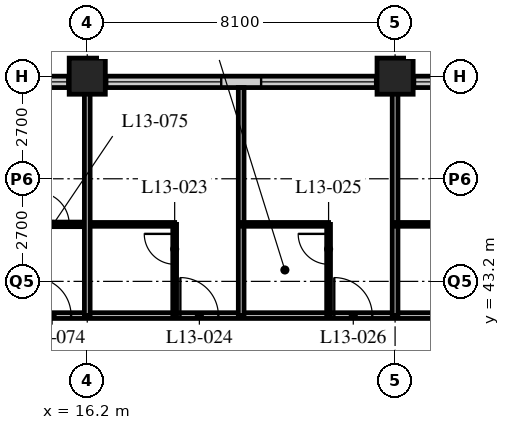
"""IFC4 building model, lengths in metres.
Left out: names, types, materials, properties, quantities, classifications, styles, units other than length and angle.
Written with IfcOpenShell. Run it as: python <this file> out.ifc"""

import sys

from ifc_helpers import new_model, si_unit, direction, frame, frame_2d, origin, origin_2d, place, context, subcontext, project, spatial, rectangle, hollow_rectangle, extrude, element, fill, save


model = new_model("IFC4")
c1 = context("Model", 3, precision=1e-05, world=origin(), true_north=direction((0.0, 1.0)))
c2 = subcontext(c1, "Body", "Model", "MODEL_VIEW")
j1 = project(units=[si_unit("LENGTHUNIT", "METRE"), si_unit("PLANEANGLEUNIT", "RADIAN")], contexts=[c1])
p1 = place(None, origin())
s1 = spatial("IfcSite", under=j1, at=p1, CompositionType="ELEMENT")
p2 = place(p1, origin())
s2 = spatial("IfcBuilding", under=s1, at=p2, CompositionType="ELEMENT")
p3 = place(p2, frame((0.0, 0.0, 56.8)))
s3 = spatial("IfcBuildingStorey", under=s2, at=p3, CompositionType="ELEMENT", Elevation=56.8)
for number, where, z_axis, x_axis in (
    (1, (16.2, 48.6, 0.0), (0.0, 0.0, 1.0), (1.0, 0.0, 0.0)),
    (2, (24.3, 48.6, 0.0), (0.0, 0.0, 1.0), (1.0, 0.0, 0.0)),
):
    element("IfcColumn", number, at=place(p3, frame(where, z_axis=z_axis, x_axis=x_axis)), inside=s3, PredefinedType="COLUMN", context=c2, shape_type="SweptSolid", body=[
        extrude(hollow_rectangle(XDim=0.95, YDim=0.95, WallThickness=0.095, at=origin_2d()), origin(), (0.0, 0.0, 1.0), 3.4),
    ])
p4 = place(p3, frame((48.3, 48.45, 0.0), z_axis=(0.0, 0.0, 1.0), x_axis=(-1.0, 0.0, 0.0)))
e3 = element("IfcWall", 3, at=p4, inside=s3, PredefinedType="SOLIDWALL", context=c2, shape_type="SweptSolid", body=[
    extrude(rectangle(XDim=40.2, YDim=0.3, at=frame_2d((20.1, 0.0))), origin(), (0.0, 0.0, 1.0), 3.19),
])
p5 = place(p4, frame((0.225, 0.0, 0.9)))
e4 = element("IfcOpeningElement", 4, at=p5, cuts=e3, PredefinedType="OPENING", context=c2, shape_type="SweptSolid", body=[
    extrude(rectangle(XDim=3.0, YDim=2.0, at=frame_2d((1.5, 1.0))), frame((0.0, 0.16, 0.0), z_axis=(0.0, -1.0, 0.0), x_axis=(1.0, 0.0, 0.0)), (0.0, 0.0, 1.0), 0.32),
])
p6 = place(p4, frame((4.275, 0.0, 0.9)))
e5 = element("IfcOpeningElement", 5, at=p6, cuts=e3, PredefinedType="OPENING", context=c2, shape_type="SweptSolid", body=[
    extrude(rectangle(XDim=3.0, YDim=2.0, at=frame_2d((1.5, 1.0))), frame((0.0, 0.16, 0.0), z_axis=(0.0, -1.0, 0.0), x_axis=(1.0, 0.0, 0.0)), (0.0, 0.0, 1.0), 0.32),
])
p7 = place(p4, frame((8.325, 0.0, 0.9)))
e6 = element("IfcOpeningElement", 6, at=p7, cuts=e3, PredefinedType="OPENING", context=c2, shape_type="SweptSolid", body=[
    extrude(rectangle(XDim=3.0, YDim=2.0, at=frame_2d((1.5, 1.0))), frame((0.0, 0.16, 0.0), z_axis=(0.0, -1.0, 0.0), x_axis=(1.0, 0.0, 0.0)), (0.0, 0.0, 1.0), 0.32),
])
p8 = place(p4, frame((12.375, 0.0, 0.9)))
e7 = element("IfcOpeningElement", 7, at=p8, cuts=e3, PredefinedType="OPENING", context=c2, shape_type="SweptSolid", body=[
    extrude(rectangle(XDim=3.0, YDim=2.0, at=frame_2d((1.5, 1.0))), frame((0.0, 0.16, 0.0), z_axis=(0.0, -1.0, 0.0), x_axis=(1.0, 0.0, 0.0)), (0.0, 0.0, 1.0), 0.32),
])
p9 = place(p4, frame((16.425, 0.0, 0.9)))
e8 = element("IfcOpeningElement", 8, at=p9, cuts=e3, PredefinedType="OPENING", context=c2, shape_type="SweptSolid", body=[
    extrude(rectangle(XDim=3.0, YDim=2.0, at=frame_2d((1.5, 1.0))), frame((0.0, 0.16, 0.0), z_axis=(0.0, -1.0, 0.0), x_axis=(1.0, 0.0, 0.0)), (0.0, 0.0, 1.0), 0.32),
])
p10 = place(p4, frame((20.475, 0.0, 0.9)))
e9 = element("IfcOpeningElement", 9, at=p10, cuts=e3, PredefinedType="OPENING", context=c2, shape_type="SweptSolid", body=[
    extrude(rectangle(XDim=3.0, YDim=2.0, at=frame_2d((1.5, 1.0))), frame((0.0, 0.16, 0.0), z_axis=(0.0, -1.0, 0.0), x_axis=(1.0, 0.0, 0.0)), (0.0, 0.0, 1.0), 0.32),
])
p11 = place(p4, frame((24.525, 0.0, 0.9)))
e10 = element("IfcOpeningElement", 10, at=p11, cuts=e3, PredefinedType="OPENING", context=c2, shape_type="SweptSolid", body=[
    extrude(rectangle(XDim=3.0, YDim=2.0, at=frame_2d((1.5, 1.0))), frame((0.0, 0.16, 0.0), z_axis=(0.0, -1.0, 0.0), x_axis=(1.0, 0.0, 0.0)), (0.0, 0.0, 1.0), 0.32),
])
p12 = place(p4, frame((28.575, 0.0, 0.9)))
e11 = element("IfcOpeningElement", 11, at=p12, cuts=e3, PredefinedType="OPENING", context=c2, shape_type="SweptSolid", body=[
    extrude(rectangle(XDim=3.0, YDim=2.0, at=frame_2d((1.5, 1.0))), frame((0.0, 0.16, 0.0), z_axis=(0.0, -1.0, 0.0), x_axis=(1.0, 0.0, 0.0)), (0.0, 0.0, 1.0), 0.32),
])
p13 = place(p4, frame((32.625, 0.0, 0.9)))
e12 = element("IfcOpeningElement", 12, at=p13, cuts=e3, PredefinedType="OPENING", context=c2, shape_type="SweptSolid", body=[
    extrude(rectangle(XDim=3.0, YDim=2.0, at=frame_2d((1.5, 1.0))), frame((0.0, 0.16, 0.0), z_axis=(0.0, -1.0, 0.0), x_axis=(1.0, 0.0, 0.0)), (0.0, 0.0, 1.0), 0.32),
])
p14 = place(p4, frame((36.675, 0.0, 0.9)))
e13 = element("IfcOpeningElement", 13, at=p14, cuts=e3, PredefinedType="OPENING", context=c2, shape_type="SweptSolid", body=[
    extrude(rectangle(XDim=3.0, YDim=2.0, at=frame_2d((1.5, 1.0))), frame((0.0, 0.16, 0.0), z_axis=(0.0, -1.0, 0.0), x_axis=(1.0, 0.0, 0.0)), (0.0, 0.0, 1.0), 0.32),
])
p15 = place(p3, frame((12.15, 42.3, 0.0), z_axis=(0.0, 0.0, 1.0), x_axis=(1.0, 0.0, 0.0)))
e14 = element("IfcWall", 14, at=p15, inside=s3, PredefinedType="PARTITIONING", context=c2, shape_type="SweptSolid", body=[
    extrude(rectangle(XDim=32.4, YDim=0.15, at=frame_2d((16.2, 0.0))), origin(), (0.0, 0.0, 1.0), 3.19),
])
p16 = place(p15, frame((6.5, 0.0, 0.0)))
e15 = element("IfcOpeningElement", 15, at=p16, cuts=e14, PredefinedType="OPENING", context=c2, shape_type="SweptSolid", body=[
    extrude(rectangle(XDim=1.0, YDim=2.1, at=frame_2d((0.5, 1.05))), frame((0.0, 0.085, 0.0), z_axis=(0.0, -1.0, 0.0), x_axis=(1.0, 0.0, 0.0)), (0.0, 0.0, 1.0), 0.17),
])
p17 = place(p15, frame((10.55, 0.0, 0.0)))
e16 = element("IfcOpeningElement", 16, at=p17, cuts=e14, PredefinedType="OPENING", context=c2, shape_type="SweptSolid", body=[
    extrude(rectangle(XDim=1.0, YDim=2.1, at=frame_2d((0.5, 1.05))), frame((0.0, 0.085, 0.0), z_axis=(0.0, -1.0, 0.0), x_axis=(1.0, 0.0, 0.0)), (0.0, 0.0, 1.0), 0.17),
])
p18 = place(p15, frame((14.6, 0.0, 0.0)))
e17 = element("IfcOpeningElement", 17, at=p18, cuts=e14, PredefinedType="OPENING", context=c2, shape_type="SweptSolid", body=[
    extrude(rectangle(XDim=1.0, YDim=2.1, at=frame_2d((0.5, 1.05))), frame((0.0, 0.085, 0.0), z_axis=(0.0, -1.0, 0.0), x_axis=(1.0, 0.0, 0.0)), (0.0, 0.0, 1.0), 0.17),
])
p19 = place(p15, frame((18.65, 0.0, 0.0)))
e18 = element("IfcOpeningElement", 18, at=p19, cuts=e14, PredefinedType="OPENING", context=c2, shape_type="SweptSolid", body=[
    extrude(rectangle(XDim=1.0, YDim=2.1, at=frame_2d((0.5, 1.05))), frame((0.0, 0.085, 0.0), z_axis=(0.0, -1.0, 0.0), x_axis=(1.0, 0.0, 0.0)), (0.0, 0.0, 1.0), 0.17),
])
p20 = place(p15, frame((22.7, 0.0, 0.0)))
e19 = element("IfcOpeningElement", 19, at=p20, cuts=e14, PredefinedType="OPENING", context=c2, shape_type="SweptSolid", body=[
    extrude(rectangle(XDim=1.0, YDim=2.1, at=frame_2d((0.5, 1.05))), frame((0.0, 0.085, 0.0), z_axis=(0.0, -1.0, 0.0), x_axis=(1.0, 0.0, 0.0)), (0.0, 0.0, 1.0), 0.17),
])
p21 = place(p15, frame((26.75, 0.0, 0.0)))
e20 = element("IfcOpeningElement", 20, at=p21, cuts=e14, PredefinedType="OPENING", context=c2, shape_type="SweptSolid", body=[
    extrude(rectangle(XDim=1.0, YDim=2.1, at=frame_2d((0.5, 1.05))), frame((0.0, 0.085, 0.0), z_axis=(0.0, -1.0, 0.0), x_axis=(1.0, 0.0, 0.0)), (0.0, 0.0, 1.0), 0.17),
])
p22 = place(p15, frame((28.775, 0.0, 0.0)))
e21 = element("IfcOpeningElement", 21, at=p22, cuts=e14, PredefinedType="OPENING", context=c2, shape_type="SweptSolid", body=[
    extrude(rectangle(XDim=1.0, YDim=2.1, at=frame_2d((0.5, 1.05))), frame((0.0, 0.085, 0.0), z_axis=(0.0, -1.0, 0.0), x_axis=(1.0, 0.0, 0.0)), (0.0, 0.0, 1.0), 0.17),
])
p23 = place(p15, frame((2.625, 0.0, 0.0)))
e22 = element("IfcOpeningElement", 22, at=p23, cuts=e14, PredefinedType="OPENING", context=c2, shape_type="SweptSolid", body=[
    extrude(rectangle(XDim=1.0, YDim=2.1, at=frame_2d((0.5, 1.05))), frame((0.0, 0.085, 0.0), z_axis=(0.0, -1.0, 0.0), x_axis=(1.0, 0.0, 0.0)), (0.0, 0.0, 1.0), 0.17),
])
p24 = place(p3, frame((16.2, 44.7, 0.0), z_axis=(0.0, 0.0, 1.0), x_axis=(1.0, 0.0, 0.0)))
e23 = element("IfcWall", 23, at=p24, inside=s3, PredefinedType="PARTITIONING", context=c2, shape_type="SweptSolid", body=[
    extrude(rectangle(XDim=2.3, YDim=0.1, at=frame_2d((1.15, 0.0))), origin(), (0.0, 0.0, 1.0), 3.19),
])
p25 = place(p3, frame((18.5, 42.3, 0.0), z_axis=(0.0, 0.0, 1.0), x_axis=(0.0, 1.0, 0.0)))
e24 = element("IfcWall", 24, at=p25, inside=s3, PredefinedType="PARTITIONING", context=c2, shape_type="SweptSolid", body=[
    extrude(rectangle(XDim=2.4, YDim=0.1, at=frame_2d((1.2, 0.0))), origin(), (0.0, 0.0, 1.0), 3.19),
])
p26 = place(p25, frame((1.35, 0.0, 0.0)))
e25 = element("IfcOpeningElement", 25, at=p26, cuts=e24, PredefinedType="OPENING", context=c2, shape_type="SweptSolid", body=[
    extrude(rectangle(XDim=0.8, YDim=2.1, at=frame_2d((0.4, 1.05))), frame((0.0, 0.06, 0.0), z_axis=(0.0, -1.0, 0.0), x_axis=(1.0, 0.0, 0.0)), (0.0, 0.0, 1.0), 0.12),
])
p27 = place(p3, frame((20.25, 42.3, 0.0), z_axis=(0.0, 0.0, 1.0), x_axis=(0.0, 1.0, 0.0)))
e26 = element("IfcWall", 26, at=p27, inside=s3, PredefinedType="PARTITIONING", context=c2, shape_type="SweptSolid", body=[
    extrude(rectangle(XDim=6.0, YDim=0.15, at=frame_2d((3.0, 0.0))), origin(), (0.0, 0.0, 1.0), 3.19),
])
p28 = place(p3, frame((20.25, 44.7, 0.0), z_axis=(0.0, 0.0, 1.0), x_axis=(1.0, 0.0, 0.0)))
e27 = element("IfcWall", 27, at=p28, inside=s3, PredefinedType="PARTITIONING", context=c2, shape_type="SweptSolid", body=[
    extrude(rectangle(XDim=2.3, YDim=0.1, at=frame_2d((1.15, 0.0))), origin(), (0.0, 0.0, 1.0), 3.19),
])
p29 = place(p3, frame((22.55, 42.3, 0.0), z_axis=(0.0, 0.0, 1.0), x_axis=(0.0, 1.0, 0.0)))
e28 = element("IfcWall", 28, at=p29, inside=s3, PredefinedType="PARTITIONING", context=c2, shape_type="SweptSolid", body=[
    extrude(rectangle(XDim=2.4, YDim=0.1, at=frame_2d((1.2, 0.0))), origin(), (0.0, 0.0, 1.0), 3.19),
])
p30 = place(p29, frame((1.35, 0.0, 0.0)))
e29 = element("IfcOpeningElement", 29, at=p30, cuts=e28, PredefinedType="OPENING", context=c2, shape_type="SweptSolid", body=[
    extrude(rectangle(XDim=0.8, YDim=2.1, at=frame_2d((0.4, 1.05))), frame((0.0, 0.06, 0.0), z_axis=(0.0, -1.0, 0.0), x_axis=(1.0, 0.0, 0.0)), (0.0, 0.0, 1.0), 0.12),
])
p31 = place(p3, frame((24.3, 42.3, 0.0), z_axis=(0.0, 0.0, 1.0), x_axis=(0.0, 1.0, 0.0)))
e30 = element("IfcWall", 30, at=p31, inside=s3, PredefinedType="PARTITIONING", context=c2, shape_type="SweptSolid", body=[
    extrude(rectangle(XDim=6.0, YDim=0.15, at=frame_2d((3.0, 0.0))), origin(), (0.0, 0.0, 1.0), 2.578),
])
p32 = place(p3, frame((24.3, 44.7, 0.0), z_axis=(0.0, 0.0, 1.0), x_axis=(1.0, 0.0, 0.0)))
e31 = element("IfcWall", 31, at=p32, inside=s3, PredefinedType="PARTITIONING", context=c2, shape_type="SweptSolid", body=[
    extrude(rectangle(XDim=2.3, YDim=0.1, at=frame_2d((1.15, 0.0))), origin(), (0.0, 0.0, 1.0), 3.19),
])
p33 = place(p3, frame((12.15, 44.7, 0.0), z_axis=(0.0, 0.0, 1.0), x_axis=(1.0, 0.0, 0.0)))
e32 = element("IfcWall", 32, at=p33, inside=s3, PredefinedType="PARTITIONING", context=c2, shape_type="SweptSolid", body=[
    extrude(rectangle(XDim=4.05, YDim=0.12, at=frame_2d((2.025, 0.0))), origin(), (0.0, 0.0, 1.0), 3.19),
])
p34 = place(p33, frame((2.725, 0.0, 0.0)))
e33 = element("IfcOpeningElement", 33, at=p34, cuts=e32, PredefinedType="OPENING", context=c2, shape_type="SweptSolid", body=[
    extrude(rectangle(XDim=0.85, YDim=2.1, at=frame_2d((0.425, 1.05))), frame((0.0, 0.07, 0.0), z_axis=(0.0, -1.0, 0.0), x_axis=(1.0, 0.0, 0.0)), (0.0, 0.0, 1.0), 0.14),
])
p35 = place(p3, frame((16.2, 42.3, 0.0), z_axis=(0.0, 0.0, 1.0), x_axis=(0.0, 1.0, 0.0)))
e34 = element("IfcWall", 34, at=p35, inside=s3, PredefinedType="PARTITIONING", context=c2, shape_type="SweptSolid", body=[
    extrude(rectangle(XDim=6.0, YDim=0.15, at=frame_2d((3.0, 0.0))), origin(), (0.0, 0.0, 1.0), 2.578),
])
p36 = place(p10, origin())
e35 = element("IfcWindow", 35, at=p36, inside=s3, PartitioningType="SINGLE_PANEL", PredefinedType="WINDOW", context=c2, shape_type="SweptSolid", body=[
    extrude(rectangle(XDim=3.0, YDim=2.0, at=frame_2d((1.5, 1.0))), frame((0.0, 0.03, 0.0), z_axis=(0.0, -1.0, 0.0), x_axis=(1.0, 0.0, 0.0)), (0.0, 0.0, 1.0), 0.06),
])
fill(e9, e35)
p37 = place(p11, origin())
e36 = element("IfcWindow", 36, at=p37, inside=s3, PartitioningType="SINGLE_PANEL", PredefinedType="WINDOW", context=c2, shape_type="SweptSolid", body=[
    extrude(rectangle(XDim=3.0, YDim=2.0, at=frame_2d((1.5, 1.0))), frame((0.0, 0.03, 0.0), z_axis=(0.0, -1.0, 0.0), x_axis=(1.0, 0.0, 0.0)), (0.0, 0.0, 1.0), 0.06),
])
fill(e10, e36)
p38 = place(p12, origin())
e37 = element("IfcWindow", 37, at=p38, inside=s3, PartitioningType="SINGLE_PANEL", PredefinedType="WINDOW", context=c2, shape_type="SweptSolid", body=[
    extrude(rectangle(XDim=3.0, YDim=2.0, at=frame_2d((1.5, 1.0))), frame((0.0, 0.03, 0.0), z_axis=(0.0, -1.0, 0.0), x_axis=(1.0, 0.0, 0.0)), (0.0, 0.0, 1.0), 0.06),
])
fill(e11, e37)
p39 = place(p13, origin())
e38 = element("IfcWindow", 38, at=p39, inside=s3, PartitioningType="SINGLE_PANEL", PredefinedType="WINDOW", context=c2, shape_type="SweptSolid", body=[
    extrude(rectangle(XDim=3.0, YDim=2.0, at=frame_2d((1.5, 1.0))), frame((0.0, 0.03, 0.0), z_axis=(0.0, -1.0, 0.0), x_axis=(1.0, 0.0, 0.0)), (0.0, 0.0, 1.0), 0.06),
])
fill(e12, e38)
p40 = place(p26, origin())
e39 = element("IfcDoor", 39, at=p40, inside=s3, OperationType="SINGLE_SWING_RIGHT", PredefinedType="DOOR", context=c2, shape_type="SweptSolid", body=[
    extrude(rectangle(XDim=0.8, YDim=2.1, at=frame_2d((0.4, 1.05))), frame((0.0, 0.025, 0.0), z_axis=(0.0, -1.0, 0.0), x_axis=(1.0, 0.0, 0.0)), (0.0, 0.0, 1.0), 0.05),
])
fill(e25, e39)
p41 = place(p16, origin())
e40 = element("IfcDoor", 40, at=p41, inside=s3, OperationType="SINGLE_SWING_LEFT", PredefinedType="DOOR", context=c2, shape_type="SweptSolid", body=[
    extrude(rectangle(XDim=1.0, YDim=2.1, at=frame_2d((0.5, 1.05))), frame((0.0, 0.025, 0.0), z_axis=(0.0, -1.0, 0.0), x_axis=(1.0, 0.0, 0.0)), (0.0, 0.0, 1.0), 0.05),
])
fill(e15, e40)
p42 = place(p30, origin())
e41 = element("IfcDoor", 41, at=p42, inside=s3, OperationType="SINGLE_SWING_RIGHT", PredefinedType="DOOR", context=c2, shape_type="SweptSolid", body=[
    extrude(rectangle(XDim=0.8, YDim=2.1, at=frame_2d((0.4, 1.05))), frame((0.0, 0.025, 0.0), z_axis=(0.0, -1.0, 0.0), x_axis=(1.0, 0.0, 0.0)), (0.0, 0.0, 1.0), 0.05),
])
fill(e29, e41)
p43 = place(p17, origin())
e42 = element("IfcDoor", 42, at=p43, inside=s3, OperationType="SINGLE_SWING_LEFT", PredefinedType="DOOR", context=c2, shape_type="SweptSolid", body=[
    extrude(rectangle(XDim=1.0, YDim=2.1, at=frame_2d((0.5, 1.05))), frame((0.0, 0.025, 0.0), z_axis=(0.0, -1.0, 0.0), x_axis=(1.0, 0.0, 0.0)), (0.0, 0.0, 1.0), 0.05),
])
fill(e16, e42)
p44 = place(p23, origin())
e43 = element("IfcDoor", 43, at=p44, inside=s3, OperationType="SINGLE_SWING_LEFT", PredefinedType="DOOR", context=c2, shape_type="SweptSolid", body=[
    extrude(rectangle(XDim=1.0, YDim=2.1, at=frame_2d((0.5, 1.05))), frame((0.0, 0.025, 0.0), z_axis=(0.0, -1.0, 0.0), x_axis=(1.0, 0.0, 0.0)), (0.0, 0.0, 1.0), 0.05),
])
fill(e22, e43)
p45 = place(p34, origin())
e44 = element("IfcDoor", 44, at=p45, inside=s3, OperationType="SINGLE_SWING_LEFT", PredefinedType="DOOR", context=c2, shape_type="SweptSolid", body=[
    extrude(rectangle(XDim=0.85, YDim=2.1, at=frame_2d((0.425, 1.05))), frame((0.0, 0.025, 0.0), z_axis=(0.0, -1.0, 0.0), x_axis=(1.0, 0.0, 0.0)), (0.0, 0.0, 1.0), 0.05),
])
fill(e33, e44)
save(model, sys.argv[1])
